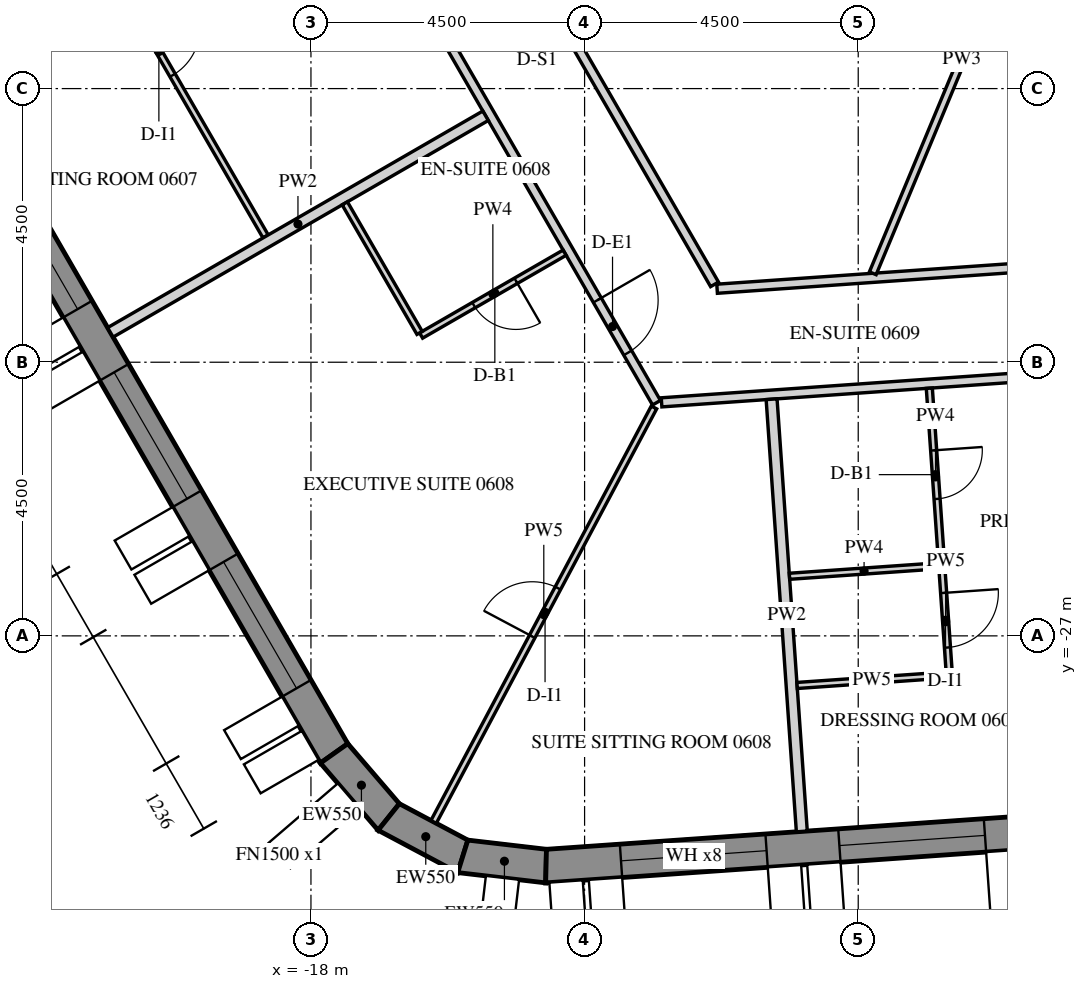
"""IFC4 building model, lengths in metres.
Left out: names, types, materials, properties, quantities, classifications, styles, units other than length and angle.
Written with IfcOpenShell. Run it as: python <this file> out.ifc"""

import sys

from ifc_helpers import new_model, si_unit, direction, frame, frame_2d, origin, place, context, subcontext, project, spatial, polyline, rectangle, outline, extrude, element, fill, save


model = new_model("IFC4")
c1 = context("Model", 3, precision=1e-05, world=origin(), true_north=direction((0.0, 1.0)))
c2 = subcontext(c1, "Body", "Model", "MODEL_VIEW")
j1 = project(units=[si_unit("LENGTHUNIT", "METRE"), si_unit("PLANEANGLEUNIT", "RADIAN")], contexts=[c1])
p1 = place(None, origin())
s1 = spatial("IfcSite", under=j1, at=p1, CompositionType="ELEMENT")
p2 = place(p1, origin())
s2 = spatial("IfcBuilding", under=s1, at=p2, CompositionType="ELEMENT")
p3 = place(p2, frame((0.0, 0.0, 92.1)))
s3 = spatial("IfcBuildingStorey", under=s2, at=p3, CompositionType="ELEMENT", Elevation=92.1)
p4 = place(p3, frame((-32.655, -2.89, -0.15), z_axis=(0.0, 0.0, 1.0), x_axis=(0.499997711317, -0.866026725152, 0.0)))
e1 = element("IfcWall", 1, at=p4, inside=s3, PredefinedType="SOLIDWALL", context=c2, shape_type="SweptSolid", body=[
    extrude(outline(polyline([(-0.022, -0.275), (30.097, -0.275), (30.045, 0.275), (0.022, 0.275), (-0.022, -0.275)])), origin(), (0.0, 0.0, 1.0), 3.9),
])
p5 = place(p4, frame((1.236, 0.0, 1.05)))
e2 = element("IfcOpeningElement", 2, at=p5, cuts=e1, PredefinedType="OPENING", context=c2, shape_type="SweptSolid", body=[
    extrude(rectangle(XDim=2.4, YDim=2.4, at=frame_2d((1.2, 1.2))), frame((0.0, 0.285, 0.0), z_axis=(0.0, -1.0, 0.0), x_axis=(1.0, 0.0, 0.0)), (0.0, 0.0, 1.0), 0.57),
])
p6 = place(p4, frame((4.835, 0.0, 1.05)))
e3 = element("IfcOpeningElement", 3, at=p6, cuts=e1, PredefinedType="OPENING", context=c2, shape_type="SweptSolid", body=[
    extrude(rectangle(XDim=2.4, YDim=2.4, at=frame_2d((1.2, 1.2))), frame((0.0, 0.285, 0.0), z_axis=(0.0, -1.0, 0.0), x_axis=(1.0, 0.0, 0.0)), (0.0, 0.0, 1.0), 0.57),
])
p7 = place(p4, frame((8.436, 0.0, 1.05)))
e4 = element("IfcOpeningElement", 4, at=p7, cuts=e1, PredefinedType="OPENING", context=c2, shape_type="SweptSolid", body=[
    extrude(rectangle(XDim=2.4, YDim=2.4, at=frame_2d((1.2, 1.2))), frame((0.0, 0.285, 0.0), z_axis=(0.0, -1.0, 0.0), x_axis=(1.0, 0.0, 0.0)), (0.0, 0.0, 1.0), 0.57),
])
p8 = place(p4, frame((12.035, 0.0, 1.05)))
e5 = element("IfcOpeningElement", 5, at=p8, cuts=e1, PredefinedType="OPENING", context=c2, shape_type="SweptSolid", body=[
    extrude(rectangle(XDim=2.4, YDim=2.4, at=frame_2d((1.2, 1.2))), frame((0.0, 0.285, 0.0), z_axis=(0.0, -1.0, 0.0), x_axis=(1.0, 0.0, 0.0)), (0.0, 0.0, 1.0), 0.57),
])
p9 = place(p4, frame((15.635, 0.0, 1.05)))
e6 = element("IfcOpeningElement", 6, at=p9, cuts=e1, PredefinedType="OPENING", context=c2, shape_type="SweptSolid", body=[
    extrude(rectangle(XDim=2.4, YDim=2.4, at=frame_2d((1.2, 1.2))), frame((0.0, 0.285, 0.0), z_axis=(0.0, -1.0, 0.0), x_axis=(1.0, 0.0, 0.0)), (0.0, 0.0, 1.0), 0.57),
])
p10 = place(p4, frame((19.236, 0.0, 1.05)))
e7 = element("IfcOpeningElement", 7, at=p10, cuts=e1, PredefinedType="OPENING", context=c2, shape_type="SweptSolid", body=[
    extrude(rectangle(XDim=2.4, YDim=2.4, at=frame_2d((1.2, 1.2))), frame((0.0, 0.285, 0.0), z_axis=(0.0, -1.0, 0.0), x_axis=(1.0, 0.0, 0.0)), (0.0, 0.0, 1.0), 0.57),
])
p11 = place(p4, frame((22.835, 0.0, 1.05)))
e8 = element("IfcOpeningElement", 8, at=p11, cuts=e1, PredefinedType="OPENING", context=c2, shape_type="SweptSolid", body=[
    extrude(rectangle(XDim=2.4, YDim=2.4, at=frame_2d((1.2, 1.2))), frame((0.0, 0.285, 0.0), z_axis=(0.0, -1.0, 0.0), x_axis=(1.0, 0.0, 0.0)), (0.0, 0.0, 1.0), 0.57),
])
p12 = place(p4, frame((26.436, 0.0, 1.05)))
e9 = element("IfcOpeningElement", 9, at=p12, cuts=e1, PredefinedType="OPENING", context=c2, shape_type="SweptSolid", body=[
    extrude(rectangle(XDim=2.4, YDim=2.4, at=frame_2d((1.2, 1.2))), frame((0.0, 0.285, 0.0), z_axis=(0.0, -1.0, 0.0), x_axis=(1.0, 0.0, 0.0)), (0.0, 0.0, 1.0), 0.57),
])
p13 = place(p3, frame((-17.619, -28.932, -0.15), z_axis=(0.0, 0.0, 1.0), x_axis=(0.651621950847, -0.758543890078, 0.0)))
e10 = element("IfcWall", 10, at=p13, inside=s3, PredefinedType="SOLIDWALL", context=c2, shape_type="SweptSolid", body=[
    extrude(outline(polyline([(-0.026, -0.275), (1.431, -0.275), (1.327, 0.275), (0.026, 0.275), (-0.026, -0.275)])), origin(), (0.0, 0.0, 1.0), 3.9),
])
p14 = place(p3, frame((-16.721, -29.979, -0.15), z_axis=(0.0, 0.0, 1.0), x_axis=(0.882994189209, -0.469383917304, 0.0)))
e11 = element("IfcWall", 11, at=p14, inside=s3, PredefinedType="SOLIDWALL", context=c2, shape_type="SweptSolid", body=[
    extrude(outline(polyline([(-0.052, -0.275), (1.431, -0.275), (1.327, 0.275), (0.052, 0.275), (-0.052, -0.275)])), origin(), (0.0, 0.0, 1.0), 3.9),
])
p15 = place(p3, frame((-15.503, -30.626, -0.15), z_axis=(0.0, 0.0, 1.0), x_axis=(0.993232537394, -0.11614269956, 0.0)))
e12 = element("IfcWall", 12, at=p15, inside=s3, PredefinedType="SOLIDWALL", context=c2, shape_type="SweptSolid", body=[
    extrude(outline(polyline([(-0.052, -0.275), (1.405, -0.275), (1.353, 0.275), (0.052, 0.275), (-0.052, -0.275)])), origin(), (0.0, 0.0, 1.0), 3.9),
])
p16 = place(p3, frame((-14.134, -30.786, -0.15), z_axis=(0.0, 0.0, 1.0), x_axis=(0.997564037441, 0.069756657061, 0.0)))
e13 = element("IfcWall", 13, at=p16, inside=s3, PredefinedType="SOLIDWALL", context=c2, shape_type="SweptSolid", body=[
    extrude(outline(polyline([(-0.026, -0.275), (30.094, -0.275), (30.049, 0.275), (0.026, 0.275), (-0.026, -0.275)])), origin(), (0.0, 0.0, 1.0), 3.9),
])
p17 = place(p16, frame((1.236, 0.0, 1.05)))
e14 = element("IfcOpeningElement", 14, at=p17, cuts=e13, PredefinedType="OPENING", context=c2, shape_type="SweptSolid", body=[
    extrude(rectangle(XDim=2.4, YDim=2.4, at=frame_2d((1.2, 1.2))), frame((0.0, 0.285, 0.0), z_axis=(0.0, -1.0, 0.0), x_axis=(1.0, 0.0, 0.0)), (0.0, 0.0, 1.0), 0.57),
])
p18 = place(p16, frame((4.835, 0.0, 1.05)))
e15 = element("IfcOpeningElement", 15, at=p18, cuts=e13, PredefinedType="OPENING", context=c2, shape_type="SweptSolid", body=[
    extrude(rectangle(XDim=2.4, YDim=2.4, at=frame_2d((1.2, 1.2))), frame((0.0, 0.285, 0.0), z_axis=(0.0, -1.0, 0.0), x_axis=(1.0, 0.0, 0.0)), (0.0, 0.0, 1.0), 0.57),
])
p19 = place(p16, frame((8.436, 0.0, 1.05)))
e16 = element("IfcOpeningElement", 16, at=p19, cuts=e13, PredefinedType="OPENING", context=c2, shape_type="SweptSolid", body=[
    extrude(rectangle(XDim=2.4, YDim=2.4, at=frame_2d((1.2, 1.2))), frame((0.0, 0.285, 0.0), z_axis=(0.0, -1.0, 0.0), x_axis=(1.0, 0.0, 0.0)), (0.0, 0.0, 1.0), 0.57),
])
p20 = place(p16, frame((12.035, 0.0, 1.05)))
e17 = element("IfcOpeningElement", 17, at=p20, cuts=e13, PredefinedType="OPENING", context=c2, shape_type="SweptSolid", body=[
    extrude(rectangle(XDim=2.4, YDim=2.4, at=frame_2d((1.2, 1.2))), frame((0.0, 0.285, 0.0), z_axis=(0.0, -1.0, 0.0), x_axis=(1.0, 0.0, 0.0)), (0.0, 0.0, 1.0), 0.57),
])
p21 = place(p16, frame((15.635, 0.0, 1.05)))
e18 = element("IfcOpeningElement", 18, at=p21, cuts=e13, PredefinedType="OPENING", context=c2, shape_type="SweptSolid", body=[
    extrude(rectangle(XDim=2.4, YDim=2.4, at=frame_2d((1.2, 1.2))), frame((0.0, 0.285, 0.0), z_axis=(0.0, -1.0, 0.0), x_axis=(1.0, 0.0, 0.0)), (0.0, 0.0, 1.0), 0.57),
])
p22 = place(p16, frame((19.236, 0.0, 1.05)))
e19 = element("IfcOpeningElement", 19, at=p22, cuts=e13, PredefinedType="OPENING", context=c2, shape_type="SweptSolid", body=[
    extrude(rectangle(XDim=2.4, YDim=2.4, at=frame_2d((1.2, 1.2))), frame((0.0, 0.285, 0.0), z_axis=(0.0, -1.0, 0.0), x_axis=(1.0, 0.0, 0.0)), (0.0, 0.0, 1.0), 0.57),
])
p23 = place(p16, frame((22.835, 0.0, 1.05)))
e20 = element("IfcOpeningElement", 20, at=p23, cuts=e13, PredefinedType="OPENING", context=c2, shape_type="SweptSolid", body=[
    extrude(rectangle(XDim=2.4, YDim=2.4, at=frame_2d((1.2, 1.2))), frame((0.0, 0.285, 0.0), z_axis=(0.0, -1.0, 0.0), x_axis=(1.0, 0.0, 0.0)), (0.0, 0.0, 1.0), 0.57),
])
p24 = place(p16, frame((26.436, 0.0, 1.05)))
e21 = element("IfcOpeningElement", 21, at=p24, cuts=e13, PredefinedType="OPENING", context=c2, shape_type="SweptSolid", body=[
    extrude(rectangle(XDim=2.4, YDim=2.4, at=frame_2d((1.2, 1.2))), frame((0.0, 0.285, 0.0), z_axis=(0.0, -1.0, 0.0), x_axis=(1.0, 0.0, 0.0)), (0.0, 0.0, 1.0), 0.57),
])
p25 = place(p3, frame((-24.436, -2.175, 0.0), z_axis=(0.0, 0.0, 1.0), x_axis=(0.499996816197, -0.866027241946, 0.0)))
e22 = element("IfcWall", 22, at=p25, inside=s3, PredefinedType="PARTITIONING", context=c2, shape_type="SweptSolid", body=[
    extrude(rectangle(XDim=24.238, YDim=0.15, at=frame_2d((12.119, 0.0))), origin(), (0.0, 0.0, 1.0), 2.988),
])
p26 = place(p25, frame((0.429, 0.0, 0.0)))
e23 = element("IfcOpeningElement", 23, at=p26, cuts=e22, PredefinedType="OPENING", context=c2, shape_type="SweptSolid", body=[
    extrude(rectangle(XDim=1.0, YDim=2.1, at=frame_2d((0.5, 1.05))), frame((0.0, 0.085, 0.0), z_axis=(0.0, -1.0, 0.0), x_axis=(1.0, 0.0, 0.0)), (0.0, 0.0, 1.0), 0.17),
])
p27 = place(p25, frame((12.346, 0.0, 0.0)))
e24 = element("IfcOpeningElement", 24, at=p27, cuts=e22, PredefinedType="OPENING", context=c2, shape_type="SweptSolid", body=[
    extrude(rectangle(XDim=1.0, YDim=2.1, at=frame_2d((0.5, 1.05))), frame((0.0, 0.085, 0.0), z_axis=(0.0, -1.0, 0.0), x_axis=(1.0, 0.0, 0.0)), (0.0, 0.0, 1.0), 0.17),
])
p28 = place(p25, frame((22.292, 0.0, 0.0)))
e25 = element("IfcOpeningElement", 25, at=p28, cuts=e22, PredefinedType="OPENING", context=c2, shape_type="SweptSolid", body=[
    extrude(rectangle(XDim=1.0, YDim=2.1, at=frame_2d((0.5, 1.05))), frame((0.0, 0.085, 0.0), z_axis=(0.0, -1.0, 0.0), x_axis=(1.0, 0.0, 0.0)), (0.0, 0.0, 1.0), 0.17),
])
p29 = place(p3, frame((-12.234, -23.16, 0.0), z_axis=(0.0, 0.0, 1.0), x_axis=(0.997563845372, 0.069759403714, 0.0)))
e26 = element("IfcWall", 26, at=p29, inside=s3, PredefinedType="PARTITIONING", context=c2, shape_type="SweptSolid", body=[
    extrude(rectangle(XDim=22.335, YDim=0.15, at=frame_2d((11.168, 0.0))), origin(), (0.0, 0.0, 1.0), 2.988),
])
p30 = place(p29, frame((9.809, 0.0, 0.0)))
e27 = element("IfcOpeningElement", 27, at=p30, cuts=e26, PredefinedType="OPENING", context=c2, shape_type="SweptSolid", body=[
    extrude(rectangle(XDim=1.0, YDim=2.1, at=frame_2d((0.5, 1.05))), frame((0.0, 0.085, 0.0), z_axis=(0.0, -1.0, 0.0), x_axis=(1.0, 0.0, 0.0)), (0.0, 0.0, 1.0), 0.17),
])
p31 = place(p29, frame((19.972, 0.0, 0.0)))
e28 = element("IfcOpeningElement", 28, at=p31, cuts=e26, PredefinedType="OPENING", context=c2, shape_type="SweptSolid", body=[
    extrude(rectangle(XDim=1.0, YDim=2.1, at=frame_2d((0.5, 1.05))), frame((0.0, 0.085, 0.0), z_axis=(0.0, -1.0, 0.0), x_axis=(1.0, 0.0, 0.0)), (0.0, 0.0, 1.0), 0.17),
])
p32 = place(p3, frame((-0.825, -20.558, 0.0), z_axis=(0.0, 0.0, 1.0), x_axis=(-0.997564524135, -0.069749696677, 0.0)))
e29 = element("IfcWall", 29, at=p32, inside=s3, PredefinedType="PARTITIONING", context=c2, shape_type="SweptSolid", body=[
    extrude(rectangle(XDim=10.522, YDim=0.15, at=frame_2d((5.261, 0.0))), origin(), (0.0, 0.0, 1.0), 2.988),
])
p33 = place(p32, frame((4.811, 0.0, 0.0)))
e30 = element("IfcOpeningElement", 30, at=p33, cuts=e29, PredefinedType="OPENING", context=c2, shape_type="SweptSolid", body=[
    extrude(rectangle(XDim=0.9, YDim=2.1, at=frame_2d((0.45, 1.05))), frame((0.0, 0.085, 0.0), z_axis=(0.0, -1.0, 0.0), x_axis=(1.0, 0.0, 0.0)), (0.0, 0.0, 1.0), 0.17),
])
p34 = place(p3, frame((-11.363, -21.219, 0.0), z_axis=(0.0, 0.0, 1.0), x_axis=(-0.50001451402, 0.866017023949, 0.0)))
e31 = element("IfcWall", 31, at=p34, inside=s3, PredefinedType="PARTITIONING", context=c2, shape_type="SweptSolid", body=[
    extrude(rectangle(XDim=11.674, YDim=0.15, at=frame_2d((5.837, 0.0))), origin(), (0.0, 0.0, 1.0), 2.988),
])
p35 = place(p34, frame((5.387, 0.0, 0.0)))
e32 = element("IfcOpeningElement", 32, at=p35, cuts=e31, PredefinedType="OPENING", context=c2, shape_type="SweptSolid", body=[
    extrude(rectangle(XDim=0.9, YDim=2.1, at=frame_2d((0.45, 1.05))), frame((0.0, 0.085, 0.0), z_axis=(0.0, -1.0, 0.0), x_axis=(1.0, 0.0, 0.0)), (0.0, 0.0, 1.0), 0.17),
])
p36 = place(p3, frame((-22.276, -14.317, 0.0), z_axis=(0.0, 0.0, 1.0), x_axis=(0.500010820671, -0.866019156377, 0.0)))
e33 = element("IfcWall", 33, at=p36, inside=s3, PredefinedType="PARTITIONING", context=c2, shape_type="SweptSolid", body=[
    extrude(rectangle(XDim=7.06, YDim=0.1, at=frame_2d((3.53, 0.0))), origin(), (0.0, 0.0, 1.0), 2.988),
])
p37 = place(p36, frame((3.1, 0.0, 0.0)))
e34 = element("IfcOpeningElement", 34, at=p37, cuts=e33, PredefinedType="OPENING", context=c2, shape_type="SweptSolid", body=[
    extrude(rectangle(XDim=0.9, YDim=2.1, at=frame_2d((0.45, 1.05))), frame((0.0, 0.06, 0.0), z_axis=(0.0, -1.0, 0.0), x_axis=(1.0, 0.0, 0.0)), (0.0, 0.0, 1.0), 0.12),
])
p38 = place(p3, frame((-21.299, -22.009, 0.0), z_axis=(0.0, 0.0, 1.0), x_axis=(0.866024672353, 0.500001266874, 0.0)))
e35 = element("IfcWall", 35, at=p38, inside=s3, PredefinedType="PARTITIONING", context=c2, shape_type="SweptSolid", body=[
    extrude(rectangle(XDim=7.125, YDim=0.18, at=frame_2d((3.562, 0.0))), origin(), (0.0, 0.0, 1.0), 2.988),
])
p39 = place(p3, frame((-13.829, -20.698, 0.0), z_axis=(0.0, 0.0, 1.0), x_axis=(-0.866012511928, -0.500022328685, 0.0)))
e36 = element("IfcWall", 36, at=p39, inside=s3, PredefinedType="PARTITIONING", context=c2, shape_type="SweptSolid", body=[
    extrude(rectangle(XDim=2.725, YDim=0.1, at=frame_2d((1.363, 0.0))), origin(), (0.0, 0.0, 1.0), 2.988),
])
p40 = place(p39, frame((0.925, 0.0, 0.0)))
e37 = element("IfcOpeningElement", 37, at=p40, cuts=e36, PredefinedType="OPENING", context=c2, shape_type="SweptSolid", body=[
    extrude(rectangle(XDim=0.8, YDim=2.1, at=frame_2d((0.4, 1.05))), frame((0.0, 0.06, 0.0), z_axis=(0.0, -1.0, 0.0), x_axis=(1.0, 0.0, 0.0)), (0.0, 0.0, 1.0), 0.12),
])
p41 = place(p3, frame((-16.213, -22.018, 0.0), z_axis=(0.0, 0.0, 1.0), x_axis=(-0.500003092839, 0.866023618125, 0.0)))
e38 = element("IfcWall", 38, at=p41, inside=s3, PredefinedType="PARTITIONING", context=c2, shape_type="SweptSolid", body=[
    extrude(rectangle(XDim=2.46, YDim=0.1, at=frame_2d((1.23, 0.0))), origin(), (0.0, 0.0, 1.0), 2.988),
])
p42 = place(p3, frame((-15.983, -30.059, 0.0), z_axis=(0.0, 0.0, 1.0), x_axis=(0.469478165736, 0.882944081976, 0.0)))
e39 = element("IfcWall", 39, at=p42, inside=s3, PredefinedType="PARTITIONING", context=c2, shape_type="SweptSolid", body=[
    extrude(rectangle(XDim=7.719, YDim=0.1, at=frame_2d((3.86, 0.0))), origin(), (0.0, 0.0, 1.0), 2.988),
])
p43 = place(p42, frame((3.454, 0.0, 0.0)))
e40 = element("IfcOpeningElement", 40, at=p43, cuts=e39, PredefinedType="OPENING", context=c2, shape_type="SweptSolid", body=[
    extrude(rectangle(XDim=0.9, YDim=2.1, at=frame_2d((0.45, 1.05))), frame((0.0, 0.06, 0.0), z_axis=(0.0, -1.0, 0.0), x_axis=(1.0, 0.0, 0.0)), (0.0, 0.0, 1.0), 0.12),
])
p44 = place(p3, frame((-9.927, -30.216, 0.0), z_axis=(0.0, 0.0, 1.0), x_axis=(-0.069764000094, 0.997563523938, 0.0)))
e41 = element("IfcWall", 41, at=p44, inside=s3, PredefinedType="PARTITIONING", context=c2, shape_type="SweptSolid", body=[
    extrude(rectangle(XDim=7.125, YDim=0.18, at=frame_2d((3.562, 0.0))), origin(), (0.0, 0.0, 1.0), 2.988),
])
p45 = place(p3, frame((-7.831, -22.927, 0.0), z_axis=(0.0, 0.0, 1.0), x_axis=(0.069775971057, -0.997562686683, 0.0)))
e42 = element("IfcWall", 42, at=p45, inside=s3, PredefinedType="PARTITIONING", context=c2, shape_type="SweptSolid", body=[
    extrude(rectangle(XDim=2.925, YDim=0.1, at=frame_2d((1.462, 0.0))), origin(), (0.0, 0.0, 1.0), 2.988),
])
p46 = place(p45, frame((1.025, 0.0, 0.0)))
e43 = element("IfcOpeningElement", 43, at=p46, cuts=e42, PredefinedType="OPENING", context=c2, shape_type="SweptSolid", body=[
    extrude(rectangle(XDim=0.8, YDim=2.1, at=frame_2d((0.4, 1.05))), frame((0.0, 0.06, 0.0), z_axis=(0.0, -1.0, 0.0), x_axis=(1.0, 0.0, 0.0)), (0.0, 0.0, 1.0), 0.12),
])
p47 = place(p3, frame((-7.623, -25.895, 0.0), z_axis=(0.0, 0.0, 1.0), x_axis=(0.069750000204, -0.997564502913, 0.0)))
e44 = element("IfcWall", 44, at=p47, inside=s3, PredefinedType="PARTITIONING", context=c2, shape_type="SweptSolid", body=[
    extrude(rectangle(XDim=1.75, YDim=0.1, at=frame_2d((0.875, 0.0))), origin(), (0.0, 0.0, 1.0), 2.988),
])
p48 = place(p47, frame((0.4, 0.0, 0.0)))
e45 = element("IfcOpeningElement", 45, at=p48, cuts=e44, PredefinedType="OPENING", context=c2, shape_type="SweptSolid", body=[
    extrude(rectangle(XDim=0.9, YDim=2.1, at=frame_2d((0.45, 1.05))), frame((0.0, 0.06, 0.0), z_axis=(0.0, -1.0, 0.0), x_axis=(1.0, 0.0, 0.0)), (0.0, 0.0, 1.0), 0.12),
])
p49 = place(p3, frame((-7.551, -27.644, 0.0), z_axis=(0.0, 0.0, 1.0), x_axis=(-0.997563389425, -0.069765923475, 0.0)))
e46 = element("IfcWall", 46, at=p49, inside=s3, PredefinedType="PARTITIONING", context=c2, shape_type="SweptSolid", body=[
    extrude(rectangle(XDim=2.46, YDim=0.1, at=frame_2d((1.23, 0.0))), origin(), (0.0, 0.0, 1.0), 2.988),
])
p50 = place(p3, frame((-10.131, -26.02, 0.0), z_axis=(0.0, 0.0, 1.0), x_axis=(0.997562906323, 0.069772830877, 0.0)))
e47 = element("IfcWall", 47, at=p50, inside=s3, PredefinedType="PARTITIONING", context=c2, shape_type="SweptSolid", body=[
    extrude(rectangle(XDim=2.46, YDim=0.1, at=frame_2d((1.23, 0.0))), origin(), (0.0, 0.0, 1.0), 2.988),
])
p51 = place(p3, frame((-5.83, -14.0, 0.0), z_axis=(0.0, 0.0, 1.0), x_axis=(-0.384440276883, -0.923149865141, 0.0)))
e48 = element("IfcWall", 48, at=p51, inside=s3, PredefinedType="PARTITIONING", context=c2, shape_type="SweptSolid", body=[
    extrude(rectangle(XDim=7.623, YDim=0.12, at=frame_2d((3.812, 0.0))), origin(), (0.0, 0.0, 1.0), 2.988),
])
p52 = place(p10, frame((0.0, 0.205, 0.0)))
e49 = element("IfcWindow", 49, at=p52, inside=s3, PartitioningType="DOUBLE_PANEL_VERTICAL", PredefinedType="WINDOW", context=c2, shape_type="SweptSolid", body=[
    extrude(rectangle(XDim=2.4, YDim=2.4, at=frame_2d((1.2, 1.2))), frame((0.0, 0.03, 0.0), z_axis=(0.0, -1.0, 0.0), x_axis=(1.0, 0.0, 0.0)), (0.0, 0.0, 1.0), 0.06),
])
fill(e7, e49)
p53 = place(p11, frame((0.0, 0.205, 0.0)))
e50 = element("IfcWindow", 50, at=p53, inside=s3, PartitioningType="DOUBLE_PANEL_VERTICAL", PredefinedType="WINDOW", context=c2, shape_type="SweptSolid", body=[
    extrude(rectangle(XDim=2.4, YDim=2.4, at=frame_2d((1.2, 1.2))), frame((0.0, 0.03, 0.0), z_axis=(0.0, -1.0, 0.0), x_axis=(1.0, 0.0, 0.0)), (0.0, 0.0, 1.0), 0.06),
])
fill(e8, e50)
p54 = place(p12, frame((0.0, 0.205, 0.0)))
e51 = element("IfcWindow", 51, at=p54, inside=s3, PartitioningType="DOUBLE_PANEL_VERTICAL", PredefinedType="WINDOW", context=c2, shape_type="SweptSolid", body=[
    extrude(rectangle(XDim=2.4, YDim=2.4, at=frame_2d((1.2, 1.2))), frame((0.0, 0.03, 0.0), z_axis=(0.0, -1.0, 0.0), x_axis=(1.0, 0.0, 0.0)), (0.0, 0.0, 1.0), 0.06),
])
fill(e9, e51)
p55 = place(p17, frame((0.0, 0.205, 0.0)))
e52 = element("IfcWindow", 52, at=p55, inside=s3, PartitioningType="DOUBLE_PANEL_VERTICAL", PredefinedType="WINDOW", context=c2, shape_type="SweptSolid", body=[
    extrude(rectangle(XDim=2.4, YDim=2.4, at=frame_2d((1.2, 1.2))), frame((0.0, 0.03, 0.0), z_axis=(0.0, -1.0, 0.0), x_axis=(1.0, 0.0, 0.0)), (0.0, 0.0, 1.0), 0.06),
])
fill(e14, e52)
p56 = place(p18, frame((0.0, 0.205, 0.0)))
e53 = element("IfcWindow", 53, at=p56, inside=s3, PartitioningType="DOUBLE_PANEL_VERTICAL", PredefinedType="WINDOW", context=c2, shape_type="SweptSolid", body=[
    extrude(rectangle(XDim=2.4, YDim=2.4, at=frame_2d((1.2, 1.2))), frame((0.0, 0.03, 0.0), z_axis=(0.0, -1.0, 0.0), x_axis=(1.0, 0.0, 0.0)), (0.0, 0.0, 1.0), 0.06),
])
fill(e15, e53)
p57 = place(p37, origin())
e54 = element("IfcDoor", 54, at=p57, inside=s3, OperationType="SINGLE_SWING_LEFT", PredefinedType="DOOR", context=c2, shape_type="SweptSolid", body=[
    extrude(rectangle(XDim=0.9, YDim=2.1, at=frame_2d((0.45, 1.05))), frame((0.0, 0.025, 0.0), z_axis=(0.0, -1.0, 0.0), x_axis=(1.0, 0.0, 0.0)), (0.0, 0.0, 1.0), 0.05),
])
fill(e34, e54)
p58 = place(p28, origin())
e55 = element("IfcDoor", 55, at=p58, inside=s3, OperationType="SINGLE_SWING_LEFT", PredefinedType="DOOR", context=c2, shape_type="SweptSolid", body=[
    extrude(rectangle(XDim=1.0, YDim=2.1, at=frame_2d((0.5, 1.05))), frame((0.0, 0.025, 0.0), z_axis=(0.0, -1.0, 0.0), x_axis=(1.0, 0.0, 0.0)), (0.0, 0.0, 1.0), 0.05),
])
fill(e25, e55)
p59 = place(p40, origin())
e56 = element("IfcDoor", 56, at=p59, inside=s3, OperationType="SINGLE_SWING_RIGHT", PredefinedType="DOOR", context=c2, shape_type="SweptSolid", body=[
    extrude(rectangle(XDim=0.8, YDim=2.1, at=frame_2d((0.4, 1.05))), frame((0.0, 0.025, 0.0), z_axis=(0.0, -1.0, 0.0), x_axis=(1.0, 0.0, 0.0)), (0.0, 0.0, 1.0), 0.05),
])
fill(e37, e56)
p60 = place(p43, origin())
e57 = element("IfcDoor", 57, at=p60, inside=s3, OperationType="SINGLE_SWING_LEFT", PredefinedType="DOOR", context=c2, shape_type="SweptSolid", body=[
    extrude(rectangle(XDim=0.9, YDim=2.1, at=frame_2d((0.45, 1.05))), frame((0.0, 0.025, 0.0), z_axis=(0.0, -1.0, 0.0), x_axis=(1.0, 0.0, 0.0)), (0.0, 0.0, 1.0), 0.05),
])
fill(e40, e57)
p61 = place(p46, origin())
e58 = element("IfcDoor", 58, at=p61, inside=s3, OperationType="SINGLE_SWING_RIGHT", PredefinedType="DOOR", context=c2, shape_type="SweptSolid", body=[
    extrude(rectangle(XDim=0.8, YDim=2.1, at=frame_2d((0.4, 1.05))), frame((0.0, 0.025, 0.0), z_axis=(0.0, -1.0, 0.0), x_axis=(1.0, 0.0, 0.0)), (0.0, 0.0, 1.0), 0.05),
])
fill(e43, e58)
p62 = place(p48, origin())
e59 = element("IfcDoor", 59, at=p62, inside=s3, OperationType="SINGLE_SWING_RIGHT", PredefinedType="DOOR", context=c2, shape_type="SweptSolid", body=[
    extrude(rectangle(XDim=0.9, YDim=2.1, at=frame_2d((0.45, 1.05))), frame((0.0, 0.025, 0.0), z_axis=(0.0, -1.0, 0.0), x_axis=(1.0, 0.0, 0.0)), (0.0, 0.0, 1.0), 0.05),
])
fill(e45, e59)
save(model, sys.argv[1])
